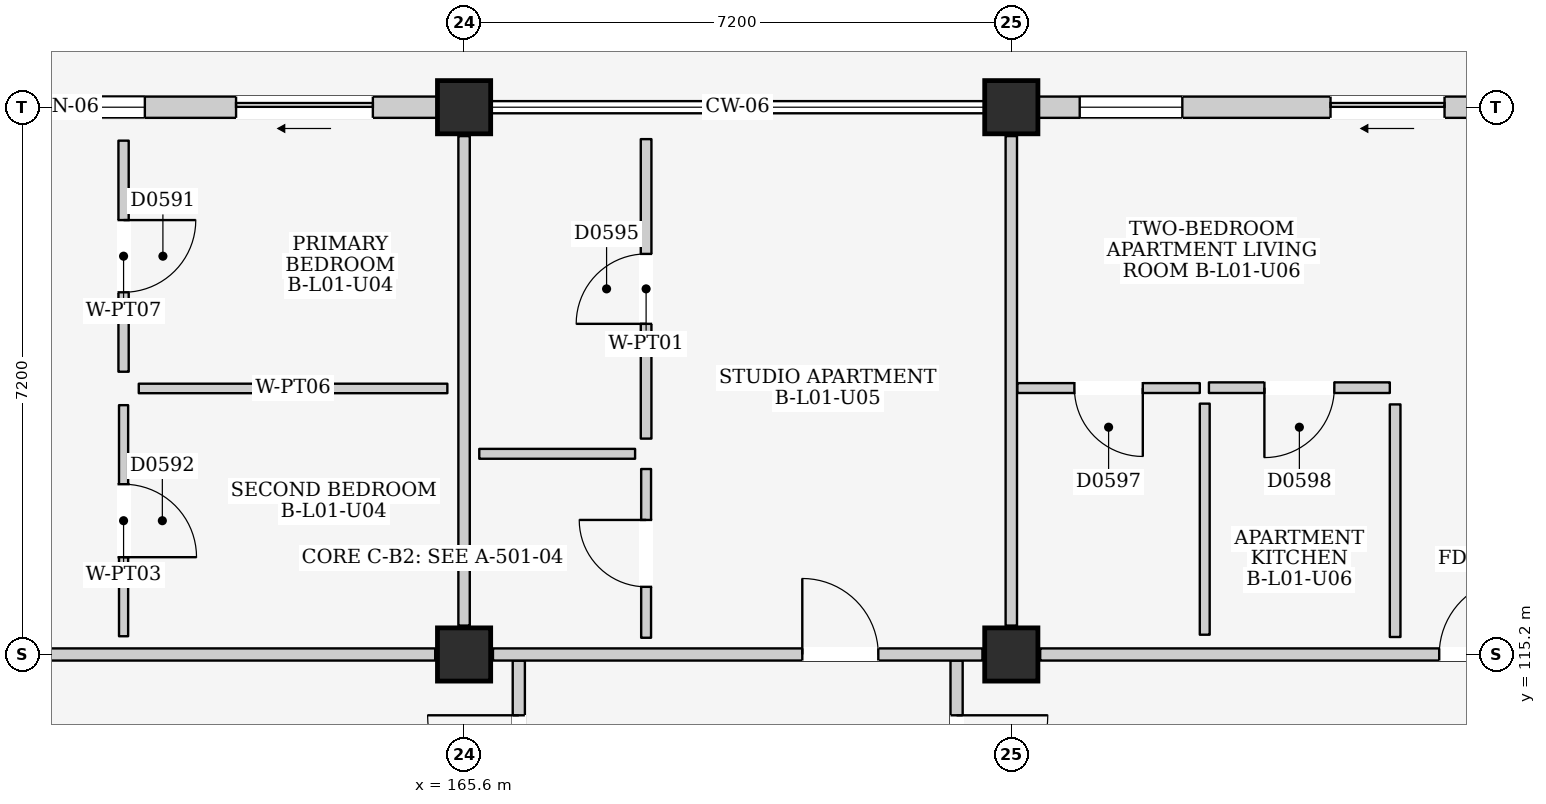
"""IFC4 building model, lengths in metres.
Left out: names, types, materials, properties, quantities, classifications, styles, units other than length and angle.
Written with IfcOpenShell. Run it as: python <this file> out.ifc"""

import sys

from ifc_helpers import new_model, si_unit, direction, frame, frame_2d, origin, origin_2d, place, context, subcontext, project, spatial, rectangle, extrude, element, fill, save


model = new_model("IFC4")
c1 = context("Model", 3, precision=1e-05, world=origin(), true_north=direction((0.0, 1.0)))
c2 = subcontext(c1, "Body", "Model", "MODEL_VIEW")
j1 = project(units=[si_unit("LENGTHUNIT", "METRE"), si_unit("PLANEANGLEUNIT", "RADIAN")], contexts=[c1])
p1 = place(None, origin())
s1 = spatial("IfcSite", under=j1, at=p1, CompositionType="ELEMENT")
p2 = place(p1, origin())
s2 = spatial("IfcBuilding", under=s1, at=p2, CompositionType="ELEMENT")
p3 = place(p2, frame((0.0, 0.0, 4.5)))
s3 = spatial("IfcBuildingStorey", under=s2, at=p3, CompositionType="ELEMENT", Elevation=4.5)
for number, where, z_axis, x_axis in (
    (1, (165.6, 115.2, 0.0), (0.0, 0.0, 1.0), (1.0, 0.0, 0.0)),
    (2, (165.6, 122.4, 0.0), (0.0, 0.0, 1.0), (1.0, 0.0, 0.0)),
    (3, (172.8, 115.2, 0.0), (0.0, 0.0, 1.0), (1.0, 0.0, 0.0)),
    (4, (172.8, 122.4, 0.0), (0.0, 0.0, 1.0), (1.0, 0.0, 0.0)),
):
    element("IfcColumn", number, at=place(p3, frame(where, z_axis=z_axis, x_axis=x_axis)), inside=s3, PredefinedType="COLUMN", context=c2, shape_type="SweptSolid", body=[
        extrude(rectangle(XDim=0.7, YDim=0.7, at=origin_2d()), origin(), (0.0, 0.0, 1.0), 4.5),
    ])
p4 = place(p3, frame((158.75, 122.4, 0.0), z_axis=(0.0, 0.0, 1.0), x_axis=(1.0, 0.0, 0.0)))
e5 = element("IfcWall", 5, at=p4, inside=s3, PredefinedType="ELEMENTEDWALL", context=c2, shape_type="SweptSolid", body=[
    extrude(rectangle(XDim=6.5, YDim=0.28, at=frame_2d((3.25, 0.0))), origin(), (0.0, 0.0, 1.0), 3.715),
])
p5 = place(p4, frame((3.85, 0.0, 0.0)))
e6 = element("IfcOpeningElement", 6, at=p5, cuts=e5, PredefinedType="OPENING", context=c2, shape_type="SweptSolid", body=[
    extrude(rectangle(XDim=1.8, YDim=2.12, at=frame_2d((0.9, 1.06))), frame((0.0, 0.155, 0.0), z_axis=(0.0, -1.0, 0.0), x_axis=(1.0, 0.0, 0.0)), (0.0, 0.0, 1.0), 0.31),
])
p6 = place(p4, frame((0.55, 0.0, 0.9)))
e7 = element("IfcOpeningElement", 7, at=p6, cuts=e5, PredefinedType="OPENING", context=c2, shape_type="SweptSolid", body=[
    extrude(rectangle(XDim=2.1, YDim=1.65, at=frame_2d((1.05, 0.825))), frame((0.0, 0.155, 0.0), z_axis=(0.0, -1.0, 0.0), x_axis=(1.0, 0.0, 0.0)), (0.0, 0.0, 1.0), 0.31),
])
p7 = place(p3, frame((173.15, 122.4, 0.0), z_axis=(0.0, 0.0, 1.0), x_axis=(1.0, 0.0, 0.0)))
e8 = element("IfcWall", 8, at=p7, inside=s3, PredefinedType="ELEMENTEDWALL", context=c2, shape_type="SweptSolid", body=[
    extrude(rectangle(XDim=6.5, YDim=0.28, at=frame_2d((3.25, 0.0))), origin(), (0.0, 0.0, 1.0), 3.715),
])
p8 = place(p7, frame((3.85, 0.0, 0.0)))
e9 = element("IfcOpeningElement", 9, at=p8, cuts=e8, PredefinedType="OPENING", context=c2, shape_type="SweptSolid", body=[
    extrude(rectangle(XDim=1.5, YDim=2.12, at=frame_2d((0.75, 1.06))), frame((0.0, 0.155, 0.0), z_axis=(0.0, -1.0, 0.0), x_axis=(1.0, 0.0, 0.0)), (0.0, 0.0, 1.0), 0.31),
])
p9 = place(p7, frame((0.55, 0.0, 0.9)))
e10 = element("IfcOpeningElement", 10, at=p9, cuts=e8, PredefinedType="OPENING", context=c2, shape_type="SweptSolid", body=[
    extrude(rectangle(XDim=1.35, YDim=1.5, at=frame_2d((0.675, 0.75))), frame((0.0, 0.155, 0.0), z_axis=(0.0, -1.0, 0.0), x_axis=(1.0, 0.0, 0.0)), (0.0, 0.0, 1.0), 0.31),
])
p10 = place(p3, frame((166.32, 110.8, 0.0), z_axis=(0.0, 0.0, 1.0), x_axis=(0.0, 1.0, 0.0)))
e11 = element("IfcWall", 11, at=p10, inside=s3, PredefinedType="PARTITIONING", context=c2, shape_type="SweptSolid", body=[
    extrude(rectangle(XDim=4.32, YDim=0.16, at=frame_2d((2.16, 0.0))), origin(), (0.0, 0.0, 1.0), 4.25),
])
p11 = place(p10, frame((2.4, 0.0, 0.0)))
e12 = element("IfcOpeningElement", 12, at=p11, cuts=e11, PredefinedType="OPENING", context=c2, shape_type="SweptSolid", body=[
    extrude(rectangle(XDim=1.2, YDim=2.2, at=frame_2d((0.6, 1.1))), frame((0.0, 0.095, 0.0), z_axis=(0.0, -1.0, 0.0), x_axis=(1.0, 0.0, 0.0)), (0.0, 0.0, 1.0), 0.19),
])
p12 = place(p3, frame((172.08, 110.8, 0.0), z_axis=(0.0, 0.0, 1.0), x_axis=(0.0, 1.0, 0.0)))
e13 = element("IfcWall", 13, at=p12, inside=s3, PredefinedType="PARTITIONING", context=c2, shape_type="SweptSolid", body=[
    extrude(rectangle(XDim=4.32, YDim=0.16, at=frame_2d((2.16, 0.0))), origin(), (0.0, 0.0, 1.0), 4.25),
])
p13 = place(p12, frame((2.4, 0.0, 0.0)))
e14 = element("IfcOpeningElement", 14, at=p13, cuts=e13, PredefinedType="OPENING", context=c2, shape_type="SweptSolid", body=[
    extrude(rectangle(XDim=1.2, YDim=2.2, at=frame_2d((0.6, 1.1))), frame((0.0, 0.095, 0.0), z_axis=(0.0, -1.0, 0.0), x_axis=(1.0, 0.0, 0.0)), (0.0, 0.0, 1.0), 0.19),
])
p14 = place(p3, frame((158.78, 115.2, 0.0), z_axis=(0.0, 0.0, 1.0), x_axis=(1.0, 0.0, 0.0)))
e15 = element("IfcWall", 15, at=p14, inside=s3, PredefinedType="PARTITIONING", context=c2, shape_type="SweptSolid", body=[
    extrude(rectangle(XDim=6.44, YDim=0.16, at=frame_2d((3.22, 0.0))), origin(), (0.0, 0.0, 1.0), 3.635),
])
p15 = place(p3, frame((165.6, 115.58, 0.0), z_axis=(0.0, 0.0, 1.0), x_axis=(0.0, 1.0, 0.0)))
e16 = element("IfcWall", 16, at=p15, inside=s3, PredefinedType="PARTITIONING", context=c2, shape_type="SweptSolid", body=[
    extrude(rectangle(XDim=6.44, YDim=0.15, at=frame_2d((3.22, 0.0))), origin(), (0.0, 0.0, 1.0), 3.685),
])
p16 = place(p3, frame((161.12, 118.92, 0.0), z_axis=(0.0, 0.0, 1.0), x_axis=(0.0, 1.0, 0.0)))
e17 = element("IfcWall", 17, at=p16, inside=s3, PredefinedType="PARTITIONING", context=c2, shape_type="SweptSolid", body=[
    extrude(rectangle(XDim=3.04, YDim=0.135, at=frame_2d((1.52, 0.0))), origin(), (0.0, 0.0, 1.0), 4.25),
])
p17 = place(p16, frame((1.045, 0.0, 0.0)))
e18 = element("IfcOpeningElement", 18, at=p17, cuts=e17, PredefinedType="OPENING", context=c2, shape_type="SweptSolid", body=[
    extrude(rectangle(XDim=0.95, YDim=2.15, at=frame_2d((0.475, 1.075))), frame((0.0, 0.083, 0.0), z_axis=(0.0, -1.0, 0.0), x_axis=(1.0, 0.0, 0.0)), (0.0, 0.0, 1.0), 0.165),
])
p18 = place(p3, frame((161.32, 118.7, 0.0), z_axis=(0.0, 0.0, 1.0), x_axis=(1.0, 0.0, 0.0)))
e19 = element("IfcWall", 19, at=p18, inside=s3, PredefinedType="PARTITIONING", context=c2, shape_type="SweptSolid", body=[
    extrude(rectangle(XDim=4.06, YDim=0.125, at=frame_2d((2.03, 0.0))), origin(), (0.0, 0.0, 1.0), 4.25),
])
p19 = place(p3, frame((161.12, 115.44, 0.0), z_axis=(0.0, 0.0, 1.0), x_axis=(0.0, 1.0, 0.0)))
e20 = element("IfcWall", 20, at=p19, inside=s3, PredefinedType="PARTITIONING", context=c2, shape_type="SweptSolid", body=[
    extrude(rectangle(XDim=3.04, YDim=0.12, at=frame_2d((1.52, 0.0))), origin(), (0.0, 0.0, 1.0), 4.25),
])
p20 = place(p19, frame((1.04, 0.0, 0.0)))
e21 = element("IfcOpeningElement", 21, at=p20, cuts=e20, PredefinedType="OPENING", context=c2, shape_type="SweptSolid", body=[
    extrude(rectangle(XDim=0.96, YDim=2.15, at=frame_2d((0.48, 1.075))), frame((0.0, 0.075, 0.0), z_axis=(0.0, -1.0, 0.0), x_axis=(1.0, 0.0, 0.0)), (0.0, 0.0, 1.0), 0.15),
])
p21 = place(p3, frame((165.98, 115.2, 0.0), z_axis=(0.0, 0.0, 1.0), x_axis=(1.0, 0.0, 0.0)))
e22 = element("IfcWall", 22, at=p21, inside=s3, PredefinedType="PARTITIONING", context=c2, shape_type="SweptSolid", body=[
    extrude(rectangle(XDim=6.44, YDim=0.16, at=frame_2d((3.22, 0.0))), origin(), (0.0, 0.0, 1.0), 3.635),
])
p22 = place(p21, frame((4.07, 0.0, 0.0)))
e23 = element("IfcOpeningElement", 23, at=p22, cuts=e22, PredefinedType="OPENING", context=c2, shape_type="SweptSolid", body=[
    extrude(rectangle(XDim=1.0, YDim=2.15, at=frame_2d((0.5, 1.075))), frame((0.0, 0.095, 0.0), z_axis=(0.0, -1.0, 0.0), x_axis=(1.0, 0.0, 0.0)), (0.0, 0.0, 1.0), 0.19),
])
p23 = place(p3, frame((172.8, 115.58, 0.0), z_axis=(0.0, 0.0, 1.0), x_axis=(0.0, 1.0, 0.0)))
e24 = element("IfcWall", 24, at=p23, inside=s3, PredefinedType="PARTITIONING", context=c2, shape_type="SweptSolid", body=[
    extrude(rectangle(XDim=6.44, YDim=0.15, at=frame_2d((3.22, 0.0))), origin(), (0.0, 0.0, 1.0), 3.685),
])
p24 = place(p3, frame((165.8, 117.84, 0.0), z_axis=(0.0, 0.0, 1.0), x_axis=(1.0, 0.0, 0.0)))
e25 = element("IfcWall", 25, at=p24, inside=s3, PredefinedType="PARTITIONING", context=c2, shape_type="SweptSolid", body=[
    extrude(rectangle(XDim=2.05, YDim=0.13, at=frame_2d((1.025, 0.0))), origin(), (0.0, 0.0, 1.0), 4.25),
])
p25 = place(p3, frame((167.995, 115.42, 0.0), z_axis=(0.0, 0.0, 1.0), x_axis=(0.0, 1.0, 0.0)))
e26 = element("IfcWall", 26, at=p25, inside=s3, PredefinedType="PARTITIONING", context=c2, shape_type="SweptSolid", body=[
    extrude(rectangle(XDim=2.22, YDim=0.13, at=frame_2d((1.11, 0.0))), origin(), (0.0, 0.0, 1.0), 4.25),
])
p26 = place(p25, frame((0.67, 0.0, 0.0)))
e27 = element("IfcOpeningElement", 27, at=p26, cuts=e26, PredefinedType="OPENING", context=c2, shape_type="SweptSolid", body=[
    extrude(rectangle(XDim=0.88, YDim=2.1, at=frame_2d((0.44, 1.05))), frame((0.0, 0.08, 0.0), z_axis=(0.0, -1.0, 0.0), x_axis=(1.0, 0.0, 0.0)), (0.0, 0.0, 1.0), 0.16),
])
p27 = place(p3, frame((167.995, 118.04, 0.0), z_axis=(0.0, 0.0, 1.0), x_axis=(0.0, 1.0, 0.0)))
e28 = element("IfcWall", 28, at=p27, inside=s3, PredefinedType="PARTITIONING", context=c2, shape_type="SweptSolid", body=[
    extrude(rectangle(XDim=3.94, YDim=0.14, at=frame_2d((1.97, 0.0))), origin(), (0.0, 0.0, 1.0), 4.25),
])
p28 = place(p27, frame((1.51, 0.0, 0.0)))
e29 = element("IfcOpeningElement", 29, at=p28, cuts=e28, PredefinedType="OPENING", context=c2, shape_type="SweptSolid", body=[
    extrude(rectangle(XDim=0.92, YDim=2.1, at=frame_2d((0.46, 1.05))), frame((0.0, 0.085, 0.0), z_axis=(0.0, -1.0, 0.0), x_axis=(1.0, 0.0, 0.0)), (0.0, 0.0, 1.0), 0.17),
])
p29 = place(p3, frame((173.18, 115.2, 0.0), z_axis=(0.0, 0.0, 1.0), x_axis=(1.0, 0.0, 0.0)))
e30 = element("IfcWall", 30, at=p29, inside=s3, PredefinedType="PARTITIONING", context=c2, shape_type="SweptSolid", body=[
    extrude(rectangle(XDim=6.44, YDim=0.16, at=frame_2d((3.22, 0.0))), origin(), (0.0, 0.0, 1.0), 3.635),
])
p30 = place(p29, frame((5.25, 0.0, 0.0)))
e31 = element("IfcOpeningElement", 31, at=p30, cuts=e30, PredefinedType="OPENING", context=c2, shape_type="SweptSolid", body=[
    extrude(rectangle(XDim=1.0, YDim=2.15, at=frame_2d((0.5, 1.075))), frame((0.0, 0.095, 0.0), z_axis=(0.0, -1.0, 0.0), x_axis=(1.0, 0.0, 0.0)), (0.0, 0.0, 1.0), 0.19),
])
p31 = place(p3, frame((172.88, 118.705, 0.0), z_axis=(0.0, 0.0, 1.0), x_axis=(1.0, 0.0, 0.0)))
e32 = element("IfcWall", 32, at=p31, inside=s3, PredefinedType="PARTITIONING", context=c2, shape_type="SweptSolid", body=[
    extrude(rectangle(XDim=2.4, YDim=0.13, at=frame_2d((1.2, 0.0))), origin(), (0.0, 0.0, 1.0), 4.25),
])
p32 = place(p31, frame((0.75, 0.0, 0.0)))
e33 = element("IfcOpeningElement", 33, at=p32, cuts=e32, PredefinedType="OPENING", context=c2, shape_type="SweptSolid", body=[
    extrude(rectangle(XDim=0.9, YDim=2.1, at=frame_2d((0.45, 1.05))), frame((0.0, 0.08, 0.0), z_axis=(0.0, -1.0, 0.0), x_axis=(1.0, 0.0, 0.0)), (0.0, 0.0, 1.0), 0.16),
])
p33 = place(p3, frame((175.345, 115.46, 0.0), z_axis=(0.0, 0.0, 1.0), x_axis=(0.0, 1.0, 0.0)))
e34 = element("IfcWall", 34, at=p33, inside=s3, PredefinedType="PARTITIONING", context=c2, shape_type="SweptSolid", body=[
    extrude(rectangle(XDim=3.04, YDim=0.13, at=frame_2d((1.52, 0.0))), origin(), (0.0, 0.0, 1.0), 4.25),
])
p34 = place(p3, frame((175.4, 118.71, 0.0), z_axis=(0.0, 0.0, 1.0), x_axis=(1.0, 0.0, 0.0)))
e35 = element("IfcWall", 35, at=p34, inside=s3, PredefinedType="PARTITIONING", context=c2, shape_type="SweptSolid", body=[
    extrude(rectangle(XDim=2.38, YDim=0.14, at=frame_2d((1.19, 0.0))), origin(), (0.0, 0.0, 1.0), 4.25),
])
p35 = place(p34, frame((0.73, 0.0, 0.0)))
e36 = element("IfcOpeningElement", 36, at=p35, cuts=e35, PredefinedType="OPENING", context=c2, shape_type="SweptSolid", body=[
    extrude(rectangle(XDim=0.92, YDim=2.1, at=frame_2d((0.46, 1.05))), frame((0.0, 0.085, 0.0), z_axis=(0.0, -1.0, 0.0), x_axis=(1.0, 0.0, 0.0)), (0.0, 0.0, 1.0), 0.17),
])
p36 = place(p3, frame((177.85, 115.43, 0.0), z_axis=(0.0, 0.0, 1.0), x_axis=(0.0, 1.0, 0.0)))
e37 = element("IfcWall", 37, at=p36, inside=s3, PredefinedType="PARTITIONING", context=c2, shape_type="SweptSolid", body=[
    extrude(rectangle(XDim=3.06, YDim=0.14, at=frame_2d((1.53, 0.0))), origin(), (0.0, 0.0, 1.0), 4.25),
])
p37 = place(p5, frame((1.8, 0.0, 0.0), z_axis=(0.0, 0.0, 1.0), x_axis=(-1.0, 0.0, 0.0)))
e38 = element("IfcDoor", 38, at=p37, inside=s3, OperationType="SLIDING_TO_LEFT", PredefinedType="DOOR", context=c2, shape_type="SweptSolid", body=[
    extrude(rectangle(XDim=1.8, YDim=2.12, at=frame_2d((0.9, 1.06))), frame((0.0, 0.025, 0.0), z_axis=(0.0, -1.0, 0.0), x_axis=(1.0, 0.0, 0.0)), (0.0, 0.0, 1.0), 0.05),
])
fill(e6, e38)
p38 = place(p6, origin())
e39 = element("IfcWindow", 39, at=p38, inside=s3, PartitioningType="DOUBLE_PANEL_VERTICAL", PredefinedType="WINDOW", context=c2, shape_type="SweptSolid", body=[
    extrude(rectangle(XDim=2.1, YDim=1.65, at=frame_2d((1.05, 0.825))), frame((0.0, 0.03, 0.0), z_axis=(0.0, -1.0, 0.0), x_axis=(1.0, 0.0, 0.0)), (0.0, 0.0, 1.0), 0.06),
])
fill(e7, e39)
p39 = place(p8, frame((1.5, 0.0, 0.0), z_axis=(0.0, 0.0, 1.0), x_axis=(-1.0, 0.0, 0.0)))
e40 = element("IfcDoor", 40, at=p39, inside=s3, OperationType="SLIDING_TO_LEFT", PredefinedType="DOOR", context=c2, shape_type="SweptSolid", body=[
    extrude(rectangle(XDim=1.5, YDim=2.12, at=frame_2d((0.75, 1.06))), frame((0.0, 0.025, 0.0), z_axis=(0.0, -1.0, 0.0), x_axis=(1.0, 0.0, 0.0)), (0.0, 0.0, 1.0), 0.05),
])
fill(e9, e40)
p40 = place(p9, origin())
e41 = element("IfcWindow", 41, at=p40, inside=s3, PartitioningType="SINGLE_PANEL", PredefinedType="WINDOW", context=c2, shape_type="SweptSolid", body=[
    extrude(rectangle(XDim=1.35, YDim=1.5, at=frame_2d((0.675, 0.75))), frame((0.0, 0.03, 0.0), z_axis=(0.0, -1.0, 0.0), x_axis=(1.0, 0.0, 0.0)), (0.0, 0.0, 1.0), 0.06),
])
fill(e10, e41)
p41 = place(p11, origin())
e42 = element("IfcDoor", 42, at=p41, inside=s3, OperationType="SINGLE_SWING_RIGHT", PredefinedType="DOOR", context=c2, shape_type="SweptSolid", body=[
    extrude(rectangle(XDim=1.2, YDim=2.2, at=frame_2d((0.6, 1.1))), frame((0.0, 0.025, 0.0), z_axis=(0.0, -1.0, 0.0), x_axis=(1.0, 0.0, 0.0)), (0.0, 0.0, 1.0), 0.05),
])
fill(e12, e42)
p42 = place(p13, frame((1.2, 0.0, 0.0), z_axis=(0.0, 0.0, 1.0), x_axis=(-1.0, 0.0, 0.0)))
e43 = element("IfcDoor", 43, at=p42, inside=s3, OperationType="SINGLE_SWING_LEFT", PredefinedType="DOOR", context=c2, shape_type="SweptSolid", body=[
    extrude(rectangle(XDim=1.2, YDim=2.2, at=frame_2d((0.6, 1.1))), frame((0.0, 0.025, 0.0), z_axis=(0.0, -1.0, 0.0), x_axis=(1.0, 0.0, 0.0)), (0.0, 0.0, 1.0), 0.05),
])
fill(e14, e43)
p43 = place(p17, frame((0.95, 0.0, 0.0), z_axis=(0.0, 0.0, 1.0), x_axis=(-1.0, 0.0, 0.0)))
e44 = element("IfcDoor", 44, at=p43, inside=s3, OperationType="SINGLE_SWING_LEFT", PredefinedType="DOOR", context=c2, shape_type="SweptSolid", body=[
    extrude(rectangle(XDim=0.95, YDim=2.15, at=frame_2d((0.475, 1.075))), frame((0.0, 0.025, 0.0), z_axis=(0.0, -1.0, 0.0), x_axis=(1.0, 0.0, 0.0)), (0.0, 0.0, 1.0), 0.05),
])
fill(e18, e44)
p44 = place(p20, frame((0.96, 0.0, 0.0), z_axis=(0.0, 0.0, 1.0), x_axis=(-1.0, 0.0, 0.0)))
e45 = element("IfcDoor", 45, at=p44, inside=s3, OperationType="SINGLE_SWING_RIGHT", PredefinedType="DOOR", context=c2, shape_type="SweptSolid", body=[
    extrude(rectangle(XDim=0.96, YDim=2.15, at=frame_2d((0.48, 1.075))), frame((0.0, 0.025, 0.0), z_axis=(0.0, -1.0, 0.0), x_axis=(1.0, 0.0, 0.0)), (0.0, 0.0, 1.0), 0.05),
])
fill(e21, e45)
p45 = place(p22, origin())
e46 = element("IfcDoor", 46, at=p45, inside=s3, OperationType="SINGLE_SWING_LEFT", PredefinedType="DOOR", context=c2, shape_type="SweptSolid", body=[
    extrude(rectangle(XDim=1.0, YDim=2.15, at=frame_2d((0.5, 1.075))), frame((0.0, 0.025, 0.0), z_axis=(0.0, -1.0, 0.0), x_axis=(1.0, 0.0, 0.0)), (0.0, 0.0, 1.0), 0.05),
])
fill(e23, e46)
p46 = place(p26, origin())
e47 = element("IfcDoor", 47, at=p46, inside=s3, OperationType="SINGLE_SWING_RIGHT", PredefinedType="DOOR", context=c2, shape_type="SweptSolid", body=[
    extrude(rectangle(XDim=0.88, YDim=2.1, at=frame_2d((0.44, 1.05))), frame((0.0, 0.025, 0.0), z_axis=(0.0, -1.0, 0.0), x_axis=(1.0, 0.0, 0.0)), (0.0, 0.0, 1.0), 0.05),
])
fill(e27, e47)
p47 = place(p28, origin())
e48 = element("IfcDoor", 48, at=p47, inside=s3, OperationType="SINGLE_SWING_LEFT", PredefinedType="DOOR", context=c2, shape_type="SweptSolid", body=[
    extrude(rectangle(XDim=0.92, YDim=2.1, at=frame_2d((0.46, 1.05))), frame((0.0, 0.025, 0.0), z_axis=(0.0, -1.0, 0.0), x_axis=(1.0, 0.0, 0.0)), (0.0, 0.0, 1.0), 0.05),
])
fill(e29, e48)
p48 = place(p30, origin())
e49 = element("IfcDoor", 49, at=p48, inside=s3, OperationType="SINGLE_SWING_RIGHT", PredefinedType="DOOR", context=c2, shape_type="SweptSolid", body=[
    extrude(rectangle(XDim=1.0, YDim=2.15, at=frame_2d((0.5, 1.075))), frame((0.0, 0.025, 0.0), z_axis=(0.0, -1.0, 0.0), x_axis=(1.0, 0.0, 0.0)), (0.0, 0.0, 1.0), 0.05),
])
fill(e31, e49)
p49 = place(p32, frame((0.9, 0.0, 0.0), z_axis=(0.0, 0.0, 1.0), x_axis=(-1.0, 0.0, 0.0)))
e50 = element("IfcDoor", 50, at=p49, inside=s3, OperationType="SINGLE_SWING_LEFT", PredefinedType="DOOR", context=c2, shape_type="SweptSolid", body=[
    extrude(rectangle(XDim=0.9, YDim=2.1, at=frame_2d((0.45, 1.05))), frame((0.0, 0.025, 0.0), z_axis=(0.0, -1.0, 0.0), x_axis=(1.0, 0.0, 0.0)), (0.0, 0.0, 1.0), 0.05),
])
fill(e33, e50)
p50 = place(p35, frame((0.92, 0.0, 0.0), z_axis=(0.0, 0.0, 1.0), x_axis=(-1.0, 0.0, 0.0)))
e51 = element("IfcDoor", 51, at=p50, inside=s3, OperationType="SINGLE_SWING_RIGHT", PredefinedType="DOOR", context=c2, shape_type="SweptSolid", body=[
    extrude(rectangle(XDim=0.92, YDim=2.1, at=frame_2d((0.46, 1.05))), frame((0.0, 0.025, 0.0), z_axis=(0.0, -1.0, 0.0), x_axis=(1.0, 0.0, 0.0)), (0.0, 0.0, 1.0), 0.05),
])
fill(e36, e51)
save(model, sys.argv[1])
